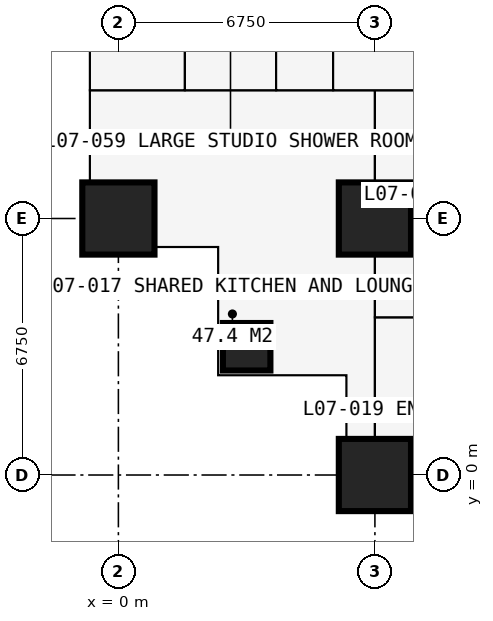
"""IFC4 building model, lengths in metres.
Left out: names, types, materials, properties, quantities, classifications, styles, units other than length and angle.
Written with IfcOpenShell. Run it as: python <this file> out.ifc"""

import sys

from ifc_helpers import new_model, si_unit, direction, frame, frame_2d, origin, origin_2d, place, context, subcontext, project, spatial, rectangle, extrude, element, fill, save


model = new_model("IFC4")
c1 = context("Model", 3, precision=1e-05, world=origin(), true_north=direction((0.0, 1.0)))
c2 = subcontext(c1, "Body", "Model", "MODEL_VIEW")
j1 = project(units=[si_unit("LENGTHUNIT", "METRE"), si_unit("PLANEANGLEUNIT", "RADIAN")], contexts=[c1])
p1 = place(None, origin())
s1 = spatial("IfcSite", under=j1, at=p1, CompositionType="ELEMENT")
p2 = place(p1, origin())
s2 = spatial("IfcBuilding", under=s1, at=p2, CompositionType="ELEMENT")
p3 = place(p2, frame((0.0, 0.0, 28.8)))
s3 = spatial("IfcBuildingStorey", under=s2, at=p3, CompositionType="ELEMENT", Elevation=28.8)
p4 = place(p3, frame((0.0, 6.75, 0.0), z_axis=(0.0, 0.0, 1.0), x_axis=(1.0, 0.0, 0.0)))
e1 = element("IfcColumn", 1, at=p4, inside=s3, PredefinedType="COLUMN", context=c2, shape_type="SweptSolid", body=[
    extrude(rectangle(XDim=1.9, YDim=1.9, at=origin_2d()), origin(), (0.0, 0.0, 1.0), 3.6),
])
p5 = place(p3, frame((3.375, 3.375, 0.0), z_axis=(0.0, 0.0, 1.0), x_axis=(1.0, 0.0, 0.0)))
e2 = element("IfcColumn", 2, at=p5, inside=s3, PredefinedType="COLUMN", context=c2, shape_type="SweptSolid", body=[
    extrude(rectangle(XDim=1.25, YDim=1.25, at=origin_2d()), origin(), (0.0, 0.0, 1.0), 3.6),
])
for number, where, z_axis, x_axis in (
    (3, (6.75, 0.0, 0.0), (0.0, 0.0, 1.0), (1.0, 0.0, 0.0)),
    (4, (6.75, 6.75, 0.0), (0.0, 0.0, 1.0), (1.0, 0.0, 0.0)),
):
    element("IfcColumn", number, at=place(p3, frame(where, z_axis=z_axis, x_axis=x_axis)), inside=s3, PredefinedType="COLUMN", context=c2, shape_type="SweptSolid", body=[
        extrude(rectangle(XDim=1.9, YDim=1.9, at=origin_2d()), origin(), (0.0, 0.0, 1.0), 3.6),
    ])
p6 = place(p3, frame((-0.75, 6.0, 0.0), z_axis=(0.0, 0.0, 1.0), x_axis=(1.0, 0.0, 0.0)))
e5 = element("IfcWall", 5, at=p6, inside=s3, PredefinedType="SOLIDWALL", context=c2, shape_type="SweptSolid", body=[
    extrude(rectangle(XDim=3.375, YDim=0.3, at=frame_2d((1.688, 0.0))), origin(), (0.0, 0.0, 1.0), 3.375),
])
p7 = place(p6, frame((1.857, 0.0, 0.9)))
e6 = element("IfcOpeningElement", 6, at=p7, cuts=e5, PredefinedType="OPENING", context=c2, shape_type="SweptSolid", body=[
    extrude(rectangle(XDim=1.2, YDim=1.8, at=frame_2d((0.6, 0.9))), frame((0.0, 0.16, 0.0), z_axis=(0.0, -1.0, 0.0), x_axis=(1.0, 0.0, 0.0)), (0.0, 0.0, 1.0), 0.32),
])
p8 = place(p3, frame((2.625, 6.0, 0.0), z_axis=(0.0, 0.0, 1.0), x_axis=(0.0, -1.0, 0.0)))
e7 = element("IfcWall", 7, at=p8, inside=s3, PredefinedType="SOLIDWALL", context=c2, shape_type="SweptSolid", body=[
    extrude(rectangle(XDim=3.375, YDim=0.3, at=frame_2d((1.688, 0.0))), origin(), (0.0, 0.0, 1.0), 3.375),
])
p9 = place(p8, frame((0.788, 0.0, 0.6)))
e8 = element("IfcOpeningElement", 8, at=p9, cuts=e7, PredefinedType="OPENING", context=c2, shape_type="SweptSolid", body=[
    extrude(rectangle(XDim=1.8, YDim=2.1, at=frame_2d((0.9, 1.05))), frame((0.0, 0.16, 0.0), z_axis=(0.0, -1.0, 0.0), x_axis=(1.0, 0.0, 0.0)), (0.0, 0.0, 1.0), 0.32),
])
p10 = place(p3, frame((2.625, 2.625, 0.0), z_axis=(0.0, 0.0, 1.0), x_axis=(1.0, 0.0, 0.0)))
e9 = element("IfcWall", 9, at=p10, inside=s3, PredefinedType="SOLIDWALL", context=c2, shape_type="SweptSolid", body=[
    extrude(rectangle(XDim=3.375, YDim=0.3, at=frame_2d((1.688, 0.0))), origin(), (0.0, 0.0, 1.0), 3.375),
])
p11 = place(p10, frame((0.788, 0.0, 0.6)))
e10 = element("IfcOpeningElement", 10, at=p11, cuts=e9, PredefinedType="OPENING", context=c2, shape_type="SweptSolid", body=[
    extrude(rectangle(XDim=1.8, YDim=2.1, at=frame_2d((0.9, 1.05))), frame((0.0, 0.16, 0.0), z_axis=(0.0, -1.0, 0.0), x_axis=(1.0, 0.0, 0.0)), (0.0, 0.0, 1.0), 0.32),
])
p12 = place(p3, frame((6.0, 2.625, 0.0), z_axis=(0.0, 0.0, 1.0), x_axis=(0.0, -1.0, 0.0)))
e11 = element("IfcWall", 11, at=p12, inside=s3, PredefinedType="SOLIDWALL", context=c2, shape_type="SweptSolid", body=[
    extrude(rectangle(XDim=3.375, YDim=0.3, at=frame_2d((1.688, 0.0))), origin(), (0.0, 0.0, 1.0), 3.375),
])
p13 = place(p12, frame((0.317, 0.0, 0.9)))
e12 = element("IfcOpeningElement", 12, at=p13, cuts=e11, PredefinedType="OPENING", context=c2, shape_type="SweptSolid", body=[
    extrude(rectangle(XDim=1.2, YDim=1.8, at=frame_2d((0.6, 0.9))), frame((0.0, 0.16, 0.0), z_axis=(0.0, -1.0, 0.0), x_axis=(1.0, 0.0, 0.0)), (0.0, 0.0, 1.0), 0.32),
])
p14 = place(p3, frame((-0.734, 10.125, 0.0), z_axis=(0.0, 0.0, 1.0), x_axis=(1.0, 0.0, 0.0)))
e13 = element("IfcWall", 13, at=p14, inside=s3, PredefinedType="PARTITIONING", context=c2, shape_type="SweptSolid", body=[
    extrude(rectangle(XDim=10.859, YDim=0.15, at=frame_2d((5.429, 0.0))), origin(), (0.0, 0.0, 1.0), 3.375),
])
p15 = place(p14, frame((5.134, 0.0, 0.0)))
e14 = element("IfcOpeningElement", 14, at=p15, cuts=e13, PredefinedType="OPENING", context=c2, shape_type="SweptSolid", body=[
    extrude(rectangle(XDim=1.0, YDim=2.2, at=frame_2d((0.5, 1.1))), frame((0.0, 0.085, 0.0), z_axis=(0.0, -1.0, 0.0), x_axis=(1.0, 0.0, 0.0)), (0.0, 0.0, 1.0), 0.17),
])
p16 = place(p3, frame((1.75, 10.125, 0.0), z_axis=(0.0, 0.0, 1.0), x_axis=(0.0, 1.0, 0.0)))
e15 = element("IfcWall", 15, at=p16, inside=s3, PredefinedType="PARTITIONING", context=c2, shape_type="SweptSolid", body=[
    extrude(rectangle(XDim=2.6, YDim=0.1, at=frame_2d((1.3, 0.0))), origin(), (0.0, 0.0, 1.0), 3.375),
])
p17 = place(p16, frame((0.85, 0.0, 0.0)))
e16 = element("IfcOpeningElement", 16, at=p17, cuts=e15, PredefinedType="OPENING", context=c2, shape_type="SweptSolid", body=[
    extrude(rectangle(XDim=0.9, YDim=2.2, at=frame_2d((0.45, 1.1))), frame((0.0, 0.06, 0.0), z_axis=(0.0, -1.0, 0.0), x_axis=(1.0, 0.0, 0.0)), (0.0, 0.0, 1.0), 0.12),
])
p18 = place(p3, frame((4.15, 10.125, 0.0), z_axis=(0.0, 0.0, 1.0), x_axis=(0.0, 1.0, 0.0)))
e17 = element("IfcWall", 17, at=p18, inside=s3, PredefinedType="PARTITIONING", context=c2, shape_type="SweptSolid", body=[
    extrude(rectangle(XDim=23.625, YDim=0.15, at=frame_2d((11.812, 0.0))), origin(), (0.0, 0.0, 1.0), 3.375),
])
p19 = place(p18, frame((4.2, 0.0, 0.0)))
e18 = element("IfcOpeningElement", 18, at=p19, cuts=e17, PredefinedType="OPENING", context=c2, shape_type="SweptSolid", body=[
    extrude(rectangle(XDim=0.95, YDim=2.2, at=frame_2d((0.475, 1.1))), frame((0.0, 0.085, 0.0), z_axis=(0.0, -1.0, 0.0), x_axis=(1.0, 0.0, 0.0)), (0.0, 0.0, 1.0), 0.17),
])
p20 = place(p18, frame((10.95, 0.0, 0.0)))
e19 = element("IfcOpeningElement", 19, at=p20, cuts=e17, PredefinedType="OPENING", context=c2, shape_type="SweptSolid", body=[
    extrude(rectangle(XDim=0.95, YDim=2.2, at=frame_2d((0.475, 1.1))), frame((0.0, 0.085, 0.0), z_axis=(0.0, -1.0, 0.0), x_axis=(1.0, 0.0, 0.0)), (0.0, 0.0, 1.0), 0.17),
])
p21 = place(p18, frame((17.7, 0.0, 0.0)))
e20 = element("IfcOpeningElement", 20, at=p21, cuts=e17, PredefinedType="OPENING", context=c2, shape_type="SweptSolid", body=[
    extrude(rectangle(XDim=0.95, YDim=2.2, at=frame_2d((0.475, 1.1))), frame((0.0, 0.085, 0.0), z_axis=(0.0, -1.0, 0.0), x_axis=(1.0, 0.0, 0.0)), (0.0, 0.0, 1.0), 0.17),
])
p22 = place(p3, frame((5.65, 10.125, 0.0), z_axis=(0.0, 0.0, 1.0), x_axis=(0.0, 1.0, 0.0)))
e21 = element("IfcWall", 21, at=p22, inside=s3, PredefinedType="PARTITIONING", context=c2, shape_type="SweptSolid", body=[
    extrude(rectangle(XDim=10.762, YDim=0.15, at=frame_2d((5.381, 0.0))), origin(), (0.0, 0.0, 1.0), 3.375),
])
p23 = place(p22, frame((4.9, 0.0, 0.0)))
e22 = element("IfcOpeningElement", 22, at=p23, cuts=e21, PredefinedType="OPENING", context=c2, shape_type="SweptSolid", body=[
    extrude(rectangle(XDim=0.95, YDim=2.2, at=frame_2d((0.475, 1.1))), frame((0.0, 0.085, 0.0), z_axis=(0.0, -1.0, 0.0), x_axis=(1.0, 0.0, 0.0)), (0.0, 0.0, 1.0), 0.17),
])
p24 = place(p3, frame((6.75, -0.734, 0.0), z_axis=(0.0, 0.0, 1.0), x_axis=(0.0, 1.0, 0.0)))
e23 = element("IfcWall", 23, at=p24, inside=s3, PredefinedType="PARTITIONING", context=c2, shape_type="SweptSolid", body=[
    extrude(rectangle(XDim=10.859, YDim=0.15, at=frame_2d((5.429, 0.0))), origin(), (0.0, 0.0, 1.0), 2.877),
])
p25 = place(p3, frame((6.75, 4.15, 0.0), z_axis=(0.0, 0.0, 1.0), x_axis=(1.0, 0.0, 0.0)))
e24 = element("IfcWall", 24, at=p25, inside=s3, PredefinedType="PARTITIONING", context=c2, shape_type="SweptSolid", body=[
    extrude(rectangle(XDim=23.625, YDim=0.15, at=frame_2d((11.812, 0.0))), origin(), (0.0, 0.0, 1.0), 3.375),
])
p26 = place(p25, frame((0.2, 0.0, 0.0)))
e25 = element("IfcOpeningElement", 25, at=p26, cuts=e24, PredefinedType="OPENING", context=c2, shape_type="SweptSolid", body=[
    extrude(rectangle(XDim=0.95, YDim=2.2, at=frame_2d((0.475, 1.1))), frame((0.0, 0.085, 0.0), z_axis=(0.0, -1.0, 0.0), x_axis=(1.0, 0.0, 0.0)), (0.0, 0.0, 1.0), 0.17),
])
p27 = place(p25, frame((3.625, 0.0, 0.0)))
e26 = element("IfcOpeningElement", 26, at=p27, cuts=e24, PredefinedType="OPENING", context=c2, shape_type="SweptSolid", body=[
    extrude(rectangle(XDim=0.95, YDim=2.2, at=frame_2d((0.475, 1.1))), frame((0.0, 0.085, 0.0), z_axis=(0.0, -1.0, 0.0), x_axis=(1.0, 0.0, 0.0)), (0.0, 0.0, 1.0), 0.17),
])
p28 = place(p25, frame((18.475, 0.0, 0.0)))
e27 = element("IfcOpeningElement", 27, at=p28, cuts=e24, PredefinedType="OPENING", context=c2, shape_type="SweptSolid", body=[
    extrude(rectangle(XDim=0.95, YDim=2.2, at=frame_2d((0.475, 1.1))), frame((0.0, 0.085, 0.0), z_axis=(0.0, -1.0, 0.0), x_axis=(1.0, 0.0, 0.0)), (0.0, 0.0, 1.0), 0.17),
])
p29 = place(p25, frame((11.725, 0.0, 0.0)))
e28 = element("IfcOpeningElement", 28, at=p29, cuts=e24, PredefinedType="OPENING", context=c2, shape_type="SweptSolid", body=[
    extrude(rectangle(XDim=0.95, YDim=2.2, at=frame_2d((0.475, 1.1))), frame((0.0, 0.085, 0.0), z_axis=(0.0, -1.0, 0.0), x_axis=(1.0, 0.0, 0.0)), (0.0, 0.0, 1.0), 0.17),
])
p30 = place(p25, frame((6.95, 0.0, 0.0)))
e29 = element("IfcOpeningElement", 29, at=p30, cuts=e24, PredefinedType="OPENING", context=c2, shape_type="SweptSolid", body=[
    extrude(rectangle(XDim=0.95, YDim=2.2, at=frame_2d((0.475, 1.1))), frame((0.0, 0.085, 0.0), z_axis=(0.0, -1.0, 0.0), x_axis=(1.0, 0.0, 0.0)), (0.0, 0.0, 1.0), 0.17),
])
p31 = place(p7, origin())
e30 = element("IfcWindow", 30, at=p31, inside=s3, PartitioningType="SINGLE_PANEL", PredefinedType="WINDOW", context=c2, shape_type="SweptSolid", body=[
    extrude(rectangle(XDim=1.2, YDim=1.8, at=frame_2d((0.6, 0.9))), frame((0.0, 0.03, 0.0), z_axis=(0.0, -1.0, 0.0), x_axis=(1.0, 0.0, 0.0)), (0.0, 0.0, 1.0), 0.06),
])
fill(e6, e30)
p32 = place(p9, origin())
e31 = element("IfcWindow", 31, at=p32, inside=s3, PartitioningType="SINGLE_PANEL", PredefinedType="WINDOW", context=c2, shape_type="SweptSolid", body=[
    extrude(rectangle(XDim=1.8, YDim=2.1, at=frame_2d((0.9, 1.05))), frame((0.0, 0.03, 0.0), z_axis=(0.0, -1.0, 0.0), x_axis=(1.0, 0.0, 0.0)), (0.0, 0.0, 1.0), 0.06),
])
fill(e8, e31)
p33 = place(p11, origin())
e32 = element("IfcWindow", 32, at=p33, inside=s3, PartitioningType="SINGLE_PANEL", PredefinedType="WINDOW", context=c2, shape_type="SweptSolid", body=[
    extrude(rectangle(XDim=1.8, YDim=2.1, at=frame_2d((0.9, 1.05))), frame((0.0, 0.03, 0.0), z_axis=(0.0, -1.0, 0.0), x_axis=(1.0, 0.0, 0.0)), (0.0, 0.0, 1.0), 0.06),
])
fill(e10, e32)
p34 = place(p13, origin())
e33 = element("IfcWindow", 33, at=p34, inside=s3, PartitioningType="SINGLE_PANEL", PredefinedType="WINDOW", context=c2, shape_type="SweptSolid", body=[
    extrude(rectangle(XDim=1.2, YDim=1.8, at=frame_2d((0.6, 0.9))), frame((0.0, 0.03, 0.0), z_axis=(0.0, -1.0, 0.0), x_axis=(1.0, 0.0, 0.0)), (0.0, 0.0, 1.0), 0.06),
])
fill(e12, e33)
p35 = place(p15, origin())
e34 = element("IfcDoor", 34, at=p35, inside=s3, OperationType="SINGLE_SWING_LEFT", PredefinedType="DOOR", context=c2, shape_type="SweptSolid", body=[
    extrude(rectangle(XDim=1.0, YDim=2.2, at=frame_2d((0.5, 1.1))), frame((0.0, 0.025, 0.0), z_axis=(0.0, -1.0, 0.0), x_axis=(1.0, 0.0, 0.0)), (0.0, 0.0, 1.0), 0.05),
])
fill(e14, e34)
p36 = place(p26, origin())
e35 = element("IfcDoor", 35, at=p36, inside=s3, OperationType="SINGLE_SWING_LEFT", PredefinedType="DOOR", context=c2, shape_type="SweptSolid", body=[
    extrude(rectangle(XDim=0.95, YDim=2.2, at=frame_2d((0.475, 1.1))), frame((0.0, 0.025, 0.0), z_axis=(0.0, -1.0, 0.0), x_axis=(1.0, 0.0, 0.0)), (0.0, 0.0, 1.0), 0.05),
])
fill(e25, e35)
p37 = place(p17, origin())
e36 = element("IfcDoor", 36, at=p37, inside=s3, OperationType="SINGLE_SWING_RIGHT", PredefinedType="DOOR", context=c2, shape_type="SweptSolid", body=[
    extrude(rectangle(XDim=0.9, YDim=2.2, at=frame_2d((0.45, 1.1))), frame((0.0, 0.025, 0.0), z_axis=(0.0, -1.0, 0.0), x_axis=(1.0, 0.0, 0.0)), (0.0, 0.0, 1.0), 0.05),
])
fill(e16, e36)
save(model, sys.argv[1])
